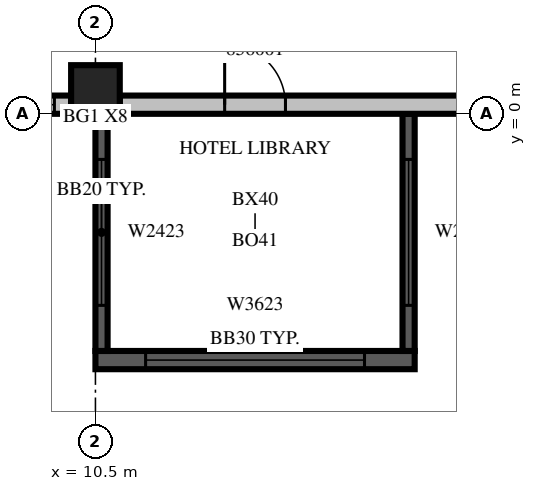
"""IFC4 building model, lengths in metres.
Left out: names, types, materials, properties, quantities, classifications, styles, units other than length and angle.
Written with IfcOpenShell. Run it as: python <this file> out.ifc"""

import sys

from ifc_helpers import new_model, si_unit, direction, frame, frame_2d, origin, origin_2d, place, context, subcontext, project, spatial, rectangle, extrude, source, transform, mapped, element, fill, save


model = new_model("IFC4")
c1 = context("Model", 3, precision=1e-05, world=origin(), true_north=direction((0.0, 1.0)))
c2 = subcontext(c1, "Body", "Model", "MODEL_VIEW")
j1 = project(units=[si_unit("LENGTHUNIT", "METRE"), si_unit("PLANEANGLEUNIT", "RADIAN")], contexts=[c1])
p1 = place(None, origin())
s1 = spatial("IfcSite", under=j1, at=p1, CompositionType="ELEMENT")
p2 = place(p1, origin())
s2 = spatial("IfcBuilding", under=s1, at=p2, CompositionType="ELEMENT")
p3 = place(p2, frame((0.0, 0.0, 246.2)))
s3 = spatial("IfcBuildingStorey", under=s2, at=p3, CompositionType="ELEMENT", Elevation=246.2)
m1 = source(origin(), c2, "Body", "SweptSolid", [
    extrude(rectangle(XDim=0.8, YDim=0.8, at=origin_2d()), origin(), (0.0, 0.0, 1.0), 3.8),
])
p4 = place(p3, frame((10.5, 0.4, 0.0), z_axis=(0.0, 0.0, 1.0), x_axis=(1.0, 0.0, 0.0)))
e1 = element("IfcColumn", 1, at=p4, inside=s3, PredefinedType="COLUMN", context=c2, shape_type="MappedRepresentation", body=[
    mapped(m1, transform((0.0, 0.0, 0.0), scale=1.0)),
])
m2 = source(origin(), c2, "Body", "SweptSolid", [
    extrude(rectangle(XDim=5.25, YDim=0.3, at=frame_2d((2.625, 0.0))), origin(), (0.0, 0.0, 1.0), 3.4),
])
p5 = place(p3, frame((10.5, -4.05, 0.0), z_axis=(0.0, 0.0, 1.0), x_axis=(1.0, 0.0, 0.0)))
e2 = element("IfcWall", 2, at=p5, inside=s3, PredefinedType="SOLIDWALL", context=c2, shape_type="MappedRepresentation", body=[
    mapped(m2, transform((0.0, 0.0, 0.0), scale=1.0)),
])
m3 = source(origin(), c2, "Body", "SweptSolid", [
    extrude(rectangle(XDim=3.6, YDim=2.3, at=frame_2d((1.8, 1.15))), frame((0.0, 0.16, 0.0), z_axis=(0.0, -1.0, 0.0), x_axis=(1.0, 0.0, 0.0)), (0.0, 0.0, 1.0), 0.32),
])
p6 = place(p5, frame((0.825, 0.0, 0.6)))
e3 = element("IfcOpeningElement", 3, at=p6, cuts=e2, PredefinedType="OPENING", context=c2, shape_type="MappedRepresentation", body=[
    mapped(m3, transform((0.0, 0.0, 0.0), scale=1.0)),
])
m4 = source(origin(), c2, "Body", "SweptSolid", [
    extrude(rectangle(XDim=3.9, YDim=0.2, at=frame_2d((1.95, 0.0))), origin(), (0.0, 0.0, 1.0), 3.4),
])
p7 = place(p3, frame((10.6, 0.0, 0.0), z_axis=(0.0, 0.0, 1.0), x_axis=(0.0, -1.0, 0.0)))
e4 = element("IfcWall", 4, at=p7, inside=s3, PredefinedType="SOLIDWALL", context=c2, shape_type="MappedRepresentation", body=[
    mapped(m4, transform((0.0, 0.0, 0.0), scale=1.0)),
])
m5 = source(origin(), c2, "Body", "SweptSolid", [
    extrude(rectangle(XDim=2.4, YDim=2.3, at=frame_2d((1.2, 1.15))), frame((0.0, 0.11, 0.0), z_axis=(0.0, -1.0, 0.0), x_axis=(1.0, 0.0, 0.0)), (0.0, 0.0, 1.0), 0.22),
])
p8 = place(p7, frame((0.75, 0.0, 0.6)))
e5 = element("IfcOpeningElement", 5, at=p8, cuts=e4, PredefinedType="OPENING", context=c2, shape_type="MappedRepresentation", body=[
    mapped(m5, transform((0.0, 0.0, 0.0), scale=1.0)),
])
p9 = place(p3, frame((15.65, 0.0, 0.0), z_axis=(0.0, 0.0, 1.0), x_axis=(0.0, -1.0, 0.0)))
e6 = element("IfcWall", 6, at=p9, inside=s3, PredefinedType="SOLIDWALL", context=c2, shape_type="MappedRepresentation", body=[
    mapped(m4, transform((0.0, 0.0, 0.0), scale=1.0)),
])
p10 = place(p9, frame((0.75, 0.0, 0.6)))
e7 = element("IfcOpeningElement", 7, at=p10, cuts=e6, PredefinedType="OPENING", context=c2, shape_type="MappedRepresentation", body=[
    mapped(m5, transform((0.0, 0.0, 0.0), scale=1.0)),
])
m6 = source(origin(), c2, "Body", "SweptSolid", [
    extrude(rectangle(XDim=2.75, YDim=0.3, at=frame_2d((1.375, 0.0))), origin(), (0.0, 0.0, 1.0), 3.4),
])
p11 = place(p3, frame((7.35, 0.15, 0.0), z_axis=(0.0, 0.0, 1.0), x_axis=(1.0, 0.0, 0.0)))
e8 = element("IfcWall", 8, at=p11, inside=s3, PredefinedType="STANDARD", context=c2, shape_type="MappedRepresentation", body=[
    mapped(m6, transform((0.0, 0.0, 0.0), scale=1.0)),
])
m7 = source(origin(), c2, "Body", "SweptSolid", [
    extrude(rectangle(XDim=1.8, YDim=2.3, at=frame_2d((0.9, 1.15))), frame((0.0, 0.16, 0.0), z_axis=(0.0, -1.0, 0.0), x_axis=(1.0, 0.0, 0.0)), (0.0, 0.0, 1.0), 0.32),
])
p12 = place(p11, frame((0.675, 0.0, 0.6)))
e9 = element("IfcOpeningElement", 9, at=p12, cuts=e8, PredefinedType="OPENING", context=c2, shape_type="MappedRepresentation", body=[
    mapped(m7, transform((0.0, 0.0, 0.0), scale=1.0)),
])
m8 = source(origin(), c2, "Body", "SweptSolid", [
    extrude(rectangle(XDim=9.7, YDim=0.3, at=frame_2d((4.85, 0.0))), origin(), (0.0, 0.0, 1.0), 3.4),
])
p13 = place(p3, frame((10.9, 0.15, 0.0), z_axis=(0.0, 0.0, 1.0), x_axis=(1.0, 0.0, 0.0)))
e10 = element("IfcWall", 10, at=p13, inside=s3, PredefinedType="STANDARD", context=c2, shape_type="MappedRepresentation", body=[
    mapped(m8, transform((0.0, 0.0, 0.0), scale=1.0)),
])
p14 = place(p13, frame((5.675, 0.0, 0.6)))
e11 = element("IfcOpeningElement", 11, at=p14, cuts=e10, PredefinedType="OPENING", context=c2, shape_type="MappedRepresentation", body=[
    mapped(m3, transform((0.0, 0.0, 0.0), scale=1.0)),
])
m9 = source(origin(), c2, "Body", "SweptSolid", [
    extrude(rectangle(XDim=1.0, YDim=2.1, at=frame_2d((0.5, 1.05))), frame((0.0, 0.16, 0.0), z_axis=(0.0, -1.0, 0.0), x_axis=(1.0, 0.0, 0.0)), (0.0, 0.0, 1.0), 0.32),
])
p15 = place(p13, frame((1.725, 0.0, 0.0)))
e12 = element("IfcOpeningElement", 12, at=p15, cuts=e10, PredefinedType="OPENING", context=c2, shape_type="MappedRepresentation", body=[
    mapped(m9, transform((0.0, 0.0, 0.0), scale=1.0)),
])
m10 = source(origin(), c2, "Body", "SweptSolid", [
    extrude(rectangle(XDim=3.6, YDim=2.3, at=frame_2d((1.8, 1.15))), frame((0.0, 0.03, 0.0), z_axis=(0.0, -1.0, 0.0), x_axis=(1.0, 0.0, 0.0)), (0.0, 0.0, 1.0), 0.06),
])
p16 = place(p6, origin())
e13 = element("IfcWindow", 13, at=p16, inside=s3, PartitioningType="SINGLE_PANEL", PredefinedType="WINDOW", context=c2, shape_type="MappedRepresentation", body=[
    mapped(m10, transform((0.0, 0.0, 0.0), scale=1.0)),
])
fill(e3, e13)
m11 = source(origin(), c2, "Body", "SweptSolid", [
    extrude(rectangle(XDim=2.4, YDim=2.3, at=frame_2d((1.2, 1.15))), frame((0.0, 0.03, 0.0), z_axis=(0.0, -1.0, 0.0), x_axis=(1.0, 0.0, 0.0)), (0.0, 0.0, 1.0), 0.06),
])
p17 = place(p8, origin())
e14 = element("IfcWindow", 14, at=p17, inside=s3, PartitioningType="SINGLE_PANEL", PredefinedType="WINDOW", context=c2, shape_type="MappedRepresentation", body=[
    mapped(m11, transform((0.0, 0.0, 0.0), scale=1.0)),
])
fill(e5, e14)
p18 = place(p10, origin())
e15 = element("IfcWindow", 15, at=p18, inside=s3, PartitioningType="SINGLE_PANEL", PredefinedType="WINDOW", context=c2, shape_type="MappedRepresentation", body=[
    mapped(m11, transform((0.0, 0.0, 0.0), scale=1.0)),
])
fill(e7, e15)
m12 = source(origin(), c2, "Body", "SweptSolid", [
    extrude(rectangle(XDim=1.8, YDim=2.3, at=frame_2d((0.9, 1.15))), frame((0.0, 0.03, 0.0), z_axis=(0.0, -1.0, 0.0), x_axis=(1.0, 0.0, 0.0)), (0.0, 0.0, 1.0), 0.06),
])
p19 = place(p12, origin())
e16 = element("IfcWindow", 16, at=p19, inside=s3, PartitioningType="SINGLE_PANEL", PredefinedType="WINDOW", context=c2, shape_type="MappedRepresentation", body=[
    mapped(m12, transform((0.0, 0.0, 0.0), scale=1.0)),
])
fill(e9, e16)
m13 = source(origin(), c2, "Body", "SweptSolid", [
    extrude(rectangle(XDim=1.0, YDim=2.1, at=frame_2d((0.5, 1.05))), frame((0.0, 0.025, 0.0), z_axis=(0.0, -1.0, 0.0), x_axis=(1.0, 0.0, 0.0)), (0.0, 0.0, 1.0), 0.05),
])
p20 = place(p15, origin())
e17 = element("IfcDoor", 17, at=p20, inside=s3, OperationType="SINGLE_SWING_LEFT", PredefinedType="DOOR", context=c2, shape_type="MappedRepresentation", body=[
    mapped(m13, transform((0.0, 0.0, 0.0), scale=1.0)),
])
fill(e12, e17)
save(model, sys.argv[1])
